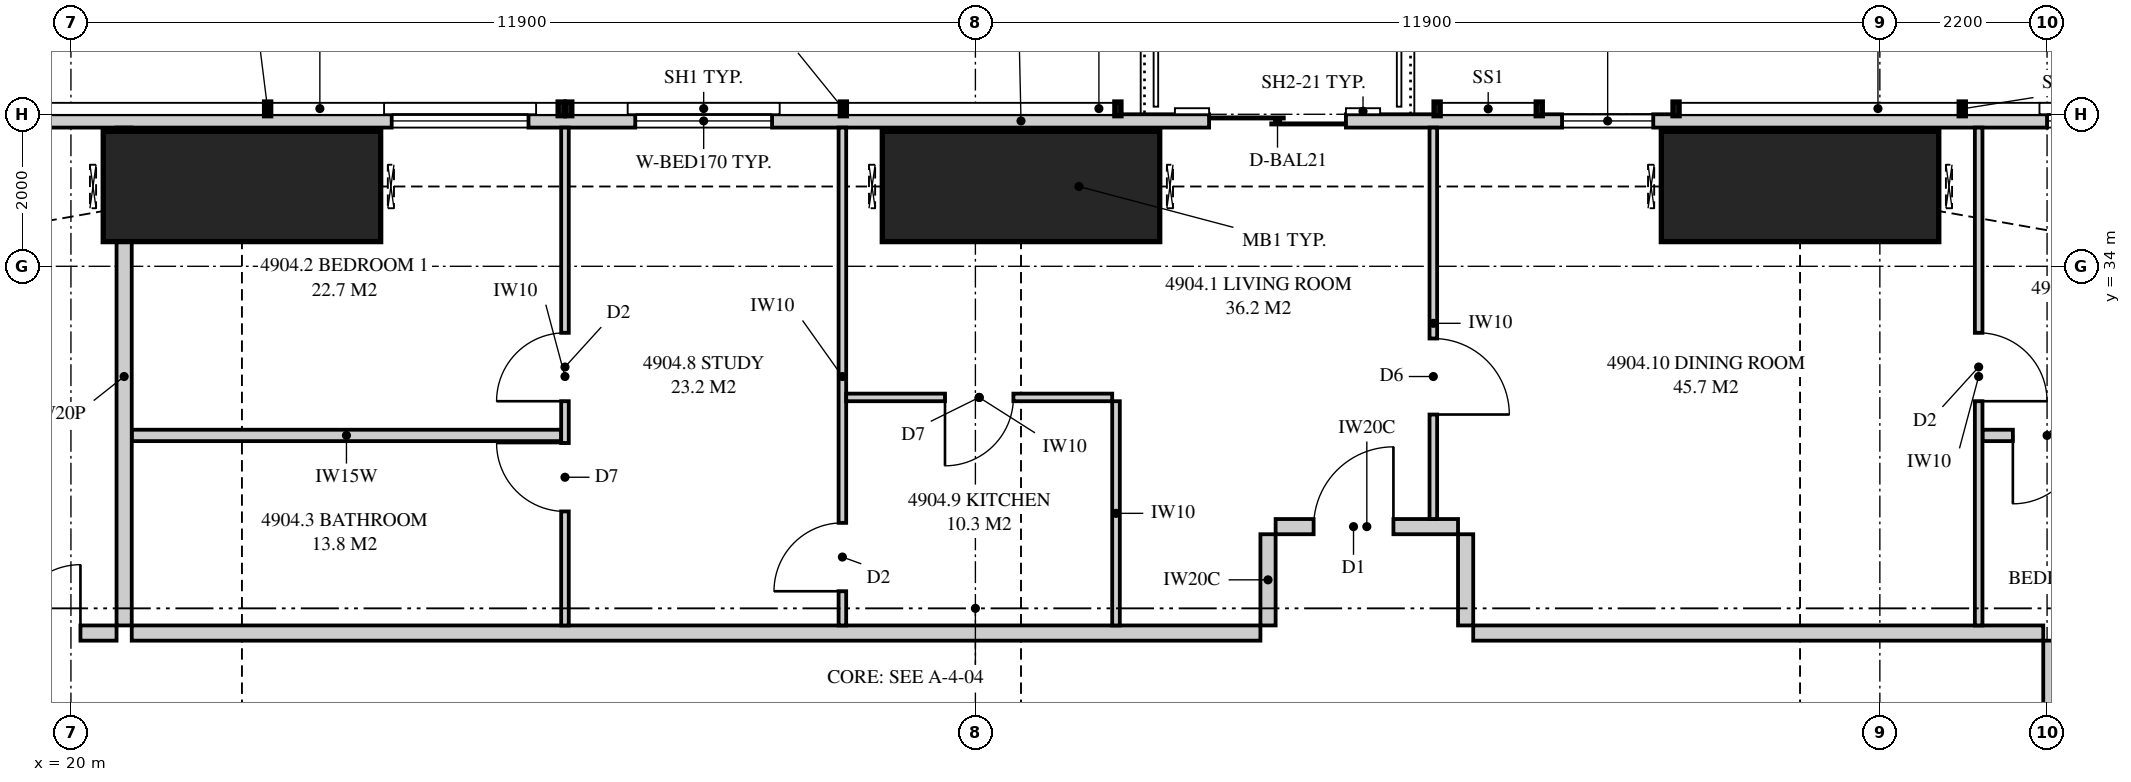
"""IFC4 building model, lengths in metres.
Left out: names, types, materials, properties, quantities, classifications, styles, units other than length and angle.
Written with IfcOpenShell. Run it as: python <this file> out.ifc"""

import sys

from ifc_helpers import new_model, si_unit, direction, frame, frame_2d, origin, origin_2d, place, context, subcontext, project, spatial, polyline, rectangle, outline, extrude, element, fill, save


model = new_model("IFC4")
c1 = context("Model", 3, precision=1e-05, world=origin(), true_north=direction((0.0, 1.0)))
c2 = subcontext(c1, "Body", "Model", "MODEL_VIEW")
j1 = project(units=[si_unit("LENGTHUNIT", "METRE"), si_unit("PLANEANGLEUNIT", "RADIAN")], contexts=[c1])
p1 = place(None, origin())
s1 = spatial("IfcSite", under=j1, at=p1, CompositionType="ELEMENT")
p2 = place(p1, origin())
s2 = spatial("IfcBuilding", under=s1, at=p2, CompositionType="ELEMENT")
p3 = place(p2, frame((0.0, 0.0, 181.15)))
s3 = spatial("IfcBuildingStorey", under=s2, at=p3, CompositionType="ELEMENT", Elevation=181.15)
for number, where, z_axis, x_axis in (
    (1, (42.75, 35.05, 0.0), (0.0, 0.0, 1.0), (0.0, 1.0, 0.0)),
    (2, (32.5, 35.05, 0.0), (0.0, 0.0, 1.0), (0.0, 1.0, 0.0)),
    (3, (22.25, 35.05, 0.0), (0.0, 0.0, 1.0), (0.0, 1.0, 0.0)),
):
    element("IfcColumn", number, at=place(p3, frame(where, z_axis=z_axis, x_axis=x_axis)), inside=s3, PredefinedType="COLUMN", context=c2, shape_type="SweptSolid", body=[
        extrude(rectangle(XDim=1.45, YDim=3.65, at=origin_2d()), origin(), (0.0, 0.0, 1.0), 3.35),
    ])
p4 = place(p3, frame((49.949, 35.913, 0.0), z_axis=(0.0, 0.0, 1.0), x_axis=(-1.0, 0.0, 0.0)))
e4 = element("IfcWall", 4, at=p4, inside=s3, PredefinedType="SOLIDWALL", context=c2, shape_type="SweptSolid", body=[
    extrude(outline(polyline([(0.0, 0.0), (34.897, 0.0), (34.897, 3.11), (27.91, 3.11), (27.91, 2.15), (27.836, 2.15), (27.836, 3.11), (27.699, 3.11), (27.699, 2.15), (7.199, 2.15), (7.199, 3.11), (7.062, 3.11), (7.062, 2.15), (6.987, 2.15), (6.987, 3.11), (0.0, 3.11), (0.0, 0.0)])), frame((0.0, 0.087, 0.0), z_axis=(0.0, -1.0, 0.0), x_axis=(1.0, 0.0, 0.0)), (0.0, 0.0, 1.0), 0.175),
])
p5 = place(p4, frame((2.149, 0.0, 0.4)))
e5 = element("IfcOpeningElement", 5, at=p5, cuts=e4, PredefinedType="OPENING", context=c2, shape_type="SweptSolid", body=[
    extrude(rectangle(XDim=1.8, YDim=1.7, at=frame_2d((0.9, 0.85))), frame((0.0, 0.097, 0.0), z_axis=(0.0, -1.0, 0.0), x_axis=(1.0, 0.0, 0.0)), (0.0, 0.0, 1.0), 0.195),
])
p6 = place(p4, frame((9.13, 0.0, 0.4)))
e6 = element("IfcOpeningElement", 6, at=p6, cuts=e4, PredefinedType="OPENING", context=c2, shape_type="SweptSolid", body=[
    extrude(rectangle(XDim=1.2, YDim=1.7, at=frame_2d((0.6, 0.85))), frame((0.0, 0.097, 0.0), z_axis=(0.0, -1.0, 0.0), x_axis=(1.0, 0.0, 0.0)), (0.0, 0.0, 1.0), 0.195),
])
p7 = place(p4, frame((13.174, 0.0, 0.0)))
e7 = element("IfcOpeningElement", 7, at=p7, cuts=e4, PredefinedType="OPENING", context=c2, shape_type="SweptSolid", body=[
    extrude(rectangle(XDim=1.8, YDim=2.1, at=frame_2d((0.9, 1.05))), frame((0.0, 0.097, 0.0), z_axis=(0.0, -1.0, 0.0), x_axis=(1.0, 0.0, 0.0)), (0.0, 0.0, 1.0), 0.195),
])
p8 = place(p4, frame((20.724, 0.0, 0.4)))
e8 = element("IfcOpeningElement", 8, at=p8, cuts=e4, PredefinedType="OPENING", context=c2, shape_type="SweptSolid", body=[
    extrude(rectangle(XDim=1.8, YDim=1.7, at=frame_2d((0.9, 0.85))), frame((0.0, 0.097, 0.0), z_axis=(0.0, -1.0, 0.0), x_axis=(1.0, 0.0, 0.0)), (0.0, 0.0, 1.0), 0.195),
])
p9 = place(p4, frame((23.929, 0.0, 0.4)))
e9 = element("IfcOpeningElement", 9, at=p9, cuts=e4, PredefinedType="OPENING", context=c2, shape_type="SweptSolid", body=[
    extrude(rectangle(XDim=1.8, YDim=1.7, at=frame_2d((0.9, 0.85))), frame((0.0, 0.097, 0.0), z_axis=(0.0, -1.0, 0.0), x_axis=(1.0, 0.0, 0.0)), (0.0, 0.0, 1.0), 0.195),
])
p10 = place(p4, frame((31.523, 0.0, 0.4)))
e10 = element("IfcOpeningElement", 10, at=p10, cuts=e4, PredefinedType="OPENING", context=c2, shape_type="SweptSolid", body=[
    extrude(rectangle(XDim=1.2, YDim=1.7, at=frame_2d((0.6, 0.85))), frame((0.0, 0.097, 0.0), z_axis=(0.0, -1.0, 0.0), x_axis=(1.0, 0.0, 0.0)), (0.0, 0.0, 1.0), 0.195),
])
p11 = place(p3, frame((20.7, 35.825, 0.0), z_axis=(0.0, 0.0, 1.0), x_axis=(0.0, -1.0, 0.0)))
e11 = element("IfcWall", 11, at=p11, inside=s3, PredefinedType="PARTITIONING", context=c2, shape_type="SweptSolid", body=[
    extrude(outline(polyline([(0.0, 0.0), (6.55, 0.0), (6.55, 3.11), (1.973, 3.11), (1.973, 2.15), (0.125, 2.15), (0.125, 3.11), (0.0, 3.11), (0.0, 0.0)])), frame((0.0, 0.1, 0.0), z_axis=(0.0, -1.0, 0.0), x_axis=(1.0, 0.0, 0.0)), (0.0, 0.0, 1.0), 0.2),
])
p12 = place(p3, frame((17.85, 29.175, 0.0), z_axis=(0.0, 0.0, 1.0), x_axis=(1.0, 0.0, 0.0)))
e12 = element("IfcWall", 12, at=p12, inside=s3, PredefinedType="PARTITIONING", context=c2, shape_type="SweptSolid", body=[
    extrude(rectangle(XDim=2.75, YDim=0.2, at=frame_2d((1.375, 0.0))), origin(), (0.0, 0.0, 1.0), 3.11),
])
p13 = place(p12, frame((0.475, 0.0, 0.0)))
e13 = element("IfcOpeningElement", 13, at=p13, cuts=e12, PredefinedType="OPENING", context=c2, shape_type="SweptSolid", body=[
    extrude(rectangle(XDim=1.8, YDim=2.1, at=frame_2d((0.9, 1.05))), frame((0.0, 0.11, 0.0), z_axis=(0.0, -1.0, 0.0), x_axis=(1.0, 0.0, 0.0)), (0.0, 0.0, 1.0), 0.22),
])
p14 = place(p3, frame((20.8, 29.175, 0.0), z_axis=(0.0, 0.0, 1.0), x_axis=(1.0, 0.0, 0.0)))
e14 = element("IfcWall", 14, at=p14, inside=s3, PredefinedType="PARTITIONING", context=c2, shape_type="SweptSolid", body=[
    extrude(outline(polyline([(0.0, 0.0), (14.85, 0.0), (14.85, 3.11), (12.037, 3.11), (12.037, 2.541), (11.363, 2.541), (11.363, 3.11), (1.787, 3.11), (1.787, 2.541), (1.113, 2.541), (1.113, 3.11), (0.0, 3.11), (0.0, 0.0)])), frame((0.0, 0.1, 0.0), z_axis=(0.0, -1.0, 0.0), x_axis=(1.0, 0.0, 0.0)), (0.0, 0.0, 1.0), 0.2),
])
p15 = place(p3, frame((26.5, 35.825, 0.0), z_axis=(0.0, 0.0, 1.0), x_axis=(0.0, -1.0, 0.0)))
e15 = element("IfcWall", 15, at=p15, inside=s3, PredefinedType="PARTITIONING", context=c2, shape_type="SweptSolid", body=[
    extrude(outline(polyline([(0.0, 0.0), (6.55, 0.0), (6.55, 3.11), (1.635, 3.11), (1.635, 2.15), (0.0, 2.15), (0.0, 3.11), (0.0, 0.0)])), frame((0.0, 0.05, 0.0), z_axis=(0.0, -1.0, 0.0), x_axis=(1.0, 0.0, 0.0)), (0.0, 0.0, 1.0), 0.1),
])
p16 = place(p15, frame((2.7, 0.0, 0.0)))
e16 = element("IfcOpeningElement", 16, at=p16, cuts=e15, PredefinedType="OPENING", context=c2, shape_type="SweptSolid", body=[
    extrude(rectangle(XDim=0.9, YDim=2.1, at=frame_2d((0.45, 1.05))), frame((0.0, 0.06, 0.0), z_axis=(0.0, -1.0, 0.0), x_axis=(1.0, 0.0, 0.0)), (0.0, 0.0, 1.0), 0.12),
])
p17 = place(p15, frame((4.15, 0.0, 0.0)))
e17 = element("IfcOpeningElement", 17, at=p17, cuts=e15, PredefinedType="OPENING", context=c2, shape_type="SweptSolid", body=[
    extrude(rectangle(XDim=0.9, YDim=2.1, at=frame_2d((0.45, 1.05))), frame((0.0, 0.06, 0.0), z_axis=(0.0, -1.0, 0.0), x_axis=(1.0, 0.0, 0.0)), (0.0, 0.0, 1.0), 0.12),
])
p18 = place(p3, frame((45.1, 35.825, 0.0), z_axis=(0.0, 0.0, 1.0), x_axis=(0.0, -1.0, 0.0)))
e18 = element("IfcWall", 18, at=p18, inside=s3, PredefinedType="PARTITIONING", context=c2, shape_type="SweptSolid", body=[
    extrude(outline(polyline([(0.0, 0.0), (6.55, 0.0), (6.55, 3.11), (2.064, 3.11), (2.064, 2.15), (0.318, 2.15), (0.318, 3.11), (0.0, 3.11), (0.0, 0.0)])), frame((0.0, 0.05, 0.0), z_axis=(0.0, -1.0, 0.0), x_axis=(1.0, 0.0, 0.0)), (0.0, 0.0, 1.0), 0.1),
])
p19 = place(p18, frame((2.7, 0.0, 0.0)))
e19 = element("IfcOpeningElement", 19, at=p19, cuts=e18, PredefinedType="OPENING", context=c2, shape_type="SweptSolid", body=[
    extrude(rectangle(XDim=0.9, YDim=2.1, at=frame_2d((0.45, 1.05))), frame((0.0, 0.06, 0.0), z_axis=(0.0, -1.0, 0.0), x_axis=(1.0, 0.0, 0.0)), (0.0, 0.0, 1.0), 0.12),
])
p20 = place(p3, frame((20.8, 31.775, 0.0), z_axis=(0.0, 0.0, 1.0), x_axis=(1.0, 0.0, 0.0)))
e20 = element("IfcWall", 20, at=p20, inside=s3, PredefinedType="PLUMBINGWALL", context=c2, shape_type="SweptSolid", body=[
    extrude(outline(polyline([(0.0, 0.0), (5.65, 0.0), (5.65, 3.11), (1.762, 3.11), (1.762, 2.541), (1.138, 2.541), (1.138, 3.11), (0.0, 3.11), (0.0, 0.0)])), frame((0.0, 0.075, 0.0), z_axis=(0.0, -1.0, 0.0), x_axis=(1.0, 0.0, 0.0)), (0.0, 0.0, 1.0), 0.15),
])
p21 = place(p3, frame((45.15, 31.775, 0.0), z_axis=(0.0, 0.0, 1.0), x_axis=(1.0, 0.0, 0.0)))
e21 = element("IfcWall", 21, at=p21, inside=s3, PredefinedType="PLUMBINGWALL", context=c2, shape_type="SweptSolid", body=[
    extrude(rectangle(XDim=3.5, YDim=0.15, at=frame_2d((1.75, 0.0))), origin(), (0.0, 0.0, 1.0), 3.11),
])
p22 = place(p21, frame((0.4, 0.0, 0.0)))
e22 = element("IfcOpeningElement", 22, at=p22, cuts=e21, PredefinedType="OPENING", context=c2, shape_type="SweptSolid", body=[
    extrude(rectangle(XDim=0.9, YDim=2.1, at=frame_2d((0.45, 1.05))), frame((0.0, 0.085, 0.0), z_axis=(0.0, -1.0, 0.0), x_axis=(1.0, 0.0, 0.0)), (0.0, 0.0, 1.0), 0.17),
])
p23 = place(p3, frame((30.15, 35.825, 0.0), z_axis=(0.0, 0.0, 1.0), x_axis=(0.0, -1.0, 0.0)))
e23 = element("IfcWall", 23, at=p23, inside=s3, PredefinedType="PARTITIONING", context=c2, shape_type="SweptSolid", body=[
    extrude(outline(polyline([(0.0, 0.0), (6.55, 0.0), (6.55, 3.11), (1.635, 3.11), (1.635, 2.15), (0.0, 2.15), (0.0, 3.11), (0.0, 0.0)])), frame((0.0, 0.05, 0.0), z_axis=(0.0, -1.0, 0.0), x_axis=(1.0, 0.0, 0.0)), (0.0, 0.0, 1.0), 0.1),
])
p24 = place(p23, frame((5.2, 0.0, 0.0)))
e24 = element("IfcOpeningElement", 24, at=p24, cuts=e23, PredefinedType="OPENING", context=c2, shape_type="SweptSolid", body=[
    extrude(rectangle(XDim=0.9, YDim=2.1, at=frame_2d((0.45, 1.05))), frame((0.0, 0.06, 0.0), z_axis=(0.0, -1.0, 0.0), x_axis=(1.0, 0.0, 0.0)), (0.0, 0.0, 1.0), 0.12),
])
p25 = place(p3, frame((30.2, 32.275, 0.0), z_axis=(0.0, 0.0, 1.0), x_axis=(1.0, 0.0, 0.0)))
e25 = element("IfcWall", 25, at=p25, inside=s3, PredefinedType="PARTITIONING", context=c2, shape_type="SweptSolid", body=[
    extrude(outline(polyline([(0.0, 0.0), (3.5, 0.0), (3.5, 3.11), (2.587, 3.11), (2.587, 2.541), (2.013, 2.541), (2.013, 3.11), (0.0, 3.11), (0.0, 0.0)])), frame((0.0, 0.05, 0.0), z_axis=(0.0, -1.0, 0.0), x_axis=(1.0, 0.0, 0.0)), (0.0, 0.0, 1.0), 0.1),
])
p26 = place(p25, frame((1.3, 0.0, 0.0)))
e26 = element("IfcOpeningElement", 26, at=p26, cuts=e25, PredefinedType="OPENING", context=c2, shape_type="SweptSolid", body=[
    extrude(rectangle(XDim=0.9, YDim=2.1, at=frame_2d((0.45, 1.05))), frame((0.0, 0.06, 0.0), z_axis=(0.0, -1.0, 0.0), x_axis=(1.0, 0.0, 0.0)), (0.0, 0.0, 1.0), 0.12),
])
p27 = place(p3, frame((33.75, 32.225, 0.0), z_axis=(0.0, 0.0, 1.0), x_axis=(0.0, -1.0, 0.0)))
e27 = element("IfcWall", 27, at=p27, inside=s3, PredefinedType="PARTITIONING", context=c2, shape_type="SweptSolid", body=[
    extrude(rectangle(XDim=2.95, YDim=0.1, at=frame_2d((1.475, 0.0))), origin(), (0.0, 0.0, 1.0), 3.11),
])
p28 = place(p3, frame((37.925, 35.825, 0.0), z_axis=(0.0, 0.0, 1.0), x_axis=(0.0, -1.0, 0.0)))
e28 = element("IfcWall", 28, at=p28, inside=s3, PredefinedType="PARTITIONING", context=c2, shape_type="SweptSolid", body=[
    extrude(outline(polyline([(0.0, 0.0), (5.15, 0.0), (5.15, 3.11), (1.635, 3.11), (1.635, 2.15), (0.0, 2.15), (0.0, 3.11), (0.0, 0.0)])), frame((0.0, 0.05, 0.0), z_axis=(0.0, -1.0, 0.0), x_axis=(1.0, 0.0, 0.0)), (0.0, 0.0, 1.0), 0.1),
])
p29 = place(p28, frame((2.775, 0.0, 0.0)))
e29 = element("IfcOpeningElement", 29, at=p29, cuts=e28, PredefinedType="OPENING", context=c2, shape_type="SweptSolid", body=[
    extrude(rectangle(XDim=1.0, YDim=2.1, at=frame_2d((0.5, 1.05))), frame((0.0, 0.06, 0.0), z_axis=(0.0, -1.0, 0.0), x_axis=(1.0, 0.0, 0.0)), (0.0, 0.0, 1.0), 0.12),
])
p30 = place(p3, frame((46.05, 23.25, 0.0), z_axis=(0.0, 0.0, 1.0), x_axis=(0.0, 1.0, 0.0)))
e30 = element("IfcWall", 30, at=p30, inside=s3, PredefinedType="PARTITIONING", context=c2, shape_type="SweptSolid", body=[
    extrude(outline(polyline([(0.0, 0.0), (5.825, 0.0), (5.825, 3.11), (2.087, 3.11), (2.087, 2.541), (1.413, 2.541), (1.413, 3.11), (0.0, 3.11), (0.0, 0.0)])), frame((0.0, 0.1, 0.0), z_axis=(0.0, -1.0, 0.0), x_axis=(1.0, 0.0, 0.0)), (0.0, 0.0, 1.0), 0.2),
])
p31 = place(p30, frame((2.413, 0.0, 0.0)))
e31 = element("IfcOpeningElement", 31, at=p31, cuts=e30, PredefinedType="OPENING", context=c2, shape_type="SweptSolid", body=[
    extrude(rectangle(XDim=1.05, YDim=2.2, at=frame_2d((0.525, 1.1))), frame((0.0, 0.11, 0.0), z_axis=(0.0, -1.0, 0.0), x_axis=(1.0, 0.0, 0.0)), (0.0, 0.0, 1.0), 0.22),
])
p32 = place(p3, frame((38.45, 29.175, 0.0), z_axis=(0.0, 0.0, 1.0), x_axis=(1.0, 0.0, 0.0)))
e32 = element("IfcWall", 32, at=p32, inside=s3, PredefinedType="PARTITIONING", context=c2, shape_type="SweptSolid", body=[
    extrude(outline(polyline([(0.0, 0.0), (7.5, 0.0), (7.5, 3.11), (4.637, 3.11), (4.637, 2.541), (3.963, 2.541), (3.963, 3.11), (0.0, 3.11), (0.0, 0.0)])), frame((0.0, 0.1, 0.0), z_axis=(0.0, -1.0, 0.0), x_axis=(1.0, 0.0, 0.0)), (0.0, 0.0, 1.0), 0.2),
])
p33 = place(p3, frame((35.85, 30.575, 0.0), z_axis=(0.0, 0.0, 1.0), x_axis=(1.0, 0.0, 0.0)))
e33 = element("IfcWall", 33, at=p33, inside=s3, PredefinedType="PARTITIONING", context=c2, shape_type="SweptSolid", body=[
    extrude(rectangle(XDim=2.4, YDim=0.2, at=frame_2d((1.2, 0.0))), origin(), (0.0, 0.0, 1.0), 3.11),
])
p34 = place(p33, frame((0.5, 0.0, 0.0)))
e34 = element("IfcOpeningElement", 34, at=p34, cuts=e33, PredefinedType="OPENING", context=c2, shape_type="SweptSolid", body=[
    extrude(rectangle(XDim=1.05, YDim=2.2, at=frame_2d((0.525, 1.1))), frame((0.0, 0.11, 0.0), z_axis=(0.0, -1.0, 0.0), x_axis=(1.0, 0.0, 0.0)), (0.0, 0.0, 1.0), 0.22),
])
for number, where, z_axis, x_axis in (
    (35, (35.75, 29.275, 0.0), (0.0, 0.0, 1.0), (0.0, 1.0, 0.0)),
    (36, (38.35, 29.275, 0.0), (0.0, 0.0, 1.0), (0.0, 1.0, 0.0)),
):
    element("IfcWall", number, at=place(p3, frame(where, z_axis=z_axis, x_axis=x_axis)), inside=s3, PredefinedType="PARTITIONING", context=c2, shape_type="SweptSolid", body=[
        extrude(rectangle(XDim=1.2, YDim=0.2, at=frame_2d((0.6, 0.0))), origin(), (0.0, 0.0, 1.0), 3.11),
    ])
p35 = place(p5, origin())
e37 = element("IfcWindow", 37, at=p35, inside=s3, PartitioningType="SINGLE_PANEL", PredefinedType="WINDOW", context=c2, shape_type="SweptSolid", body=[
    extrude(rectangle(XDim=1.8, YDim=1.7, at=frame_2d((0.9, 0.85))), frame((0.0, 0.03, 0.0), z_axis=(0.0, -1.0, 0.0), x_axis=(1.0, 0.0, 0.0)), (0.0, 0.0, 1.0), 0.06),
])
fill(e5, e37)
p36 = place(p6, origin())
e38 = element("IfcWindow", 38, at=p36, inside=s3, PartitioningType="SINGLE_PANEL", PredefinedType="WINDOW", context=c2, shape_type="SweptSolid", body=[
    extrude(rectangle(XDim=1.2, YDim=1.7, at=frame_2d((0.6, 0.85))), frame((0.0, 0.03, 0.0), z_axis=(0.0, -1.0, 0.0), x_axis=(1.0, 0.0, 0.0)), (0.0, 0.0, 1.0), 0.06),
])
fill(e6, e38)
p37 = place(p7, origin())
e39 = element("IfcDoor", 39, at=p37, inside=s3, OperationType="SLIDING_TO_LEFT", PredefinedType="DOOR", context=c2, shape_type="SweptSolid", body=[
    extrude(rectangle(XDim=1.8, YDim=2.1, at=frame_2d((0.9, 1.05))), frame((0.0, 0.025, 0.0), z_axis=(0.0, -1.0, 0.0), x_axis=(1.0, 0.0, 0.0)), (0.0, 0.0, 1.0), 0.05),
])
fill(e7, e39)
p38 = place(p8, origin())
e40 = element("IfcWindow", 40, at=p38, inside=s3, PartitioningType="SINGLE_PANEL", PredefinedType="WINDOW", context=c2, shape_type="SweptSolid", body=[
    extrude(rectangle(XDim=1.8, YDim=1.7, at=frame_2d((0.9, 0.85))), frame((0.0, 0.03, 0.0), z_axis=(0.0, -1.0, 0.0), x_axis=(1.0, 0.0, 0.0)), (0.0, 0.0, 1.0), 0.06),
])
fill(e8, e40)
p39 = place(p9, origin())
e41 = element("IfcWindow", 41, at=p39, inside=s3, PartitioningType="SINGLE_PANEL", PredefinedType="WINDOW", context=c2, shape_type="SweptSolid", body=[
    extrude(rectangle(XDim=1.8, YDim=1.7, at=frame_2d((0.9, 0.85))), frame((0.0, 0.03, 0.0), z_axis=(0.0, -1.0, 0.0), x_axis=(1.0, 0.0, 0.0)), (0.0, 0.0, 1.0), 0.06),
])
fill(e9, e41)
p40 = place(p13, origin())
e42 = element("IfcDoor", 42, at=p40, inside=s3, OperationType="DOUBLE_DOOR_SINGLE_SWING", PredefinedType="DOOR", context=c2, shape_type="SweptSolid", body=[
    extrude(rectangle(XDim=1.8, YDim=2.1, at=frame_2d((0.9, 1.05))), frame((0.0, 0.025, 0.0), z_axis=(0.0, -1.0, 0.0), x_axis=(1.0, 0.0, 0.0)), (0.0, 0.0, 1.0), 0.05),
])
fill(e13, e42)
p41 = place(p34, origin())
e43 = element("IfcDoor", 43, at=p41, inside=s3, OperationType="SINGLE_SWING_RIGHT", PredefinedType="DOOR", context=c2, shape_type="SweptSolid", body=[
    extrude(rectangle(XDim=1.05, YDim=2.2, at=frame_2d((0.525, 1.1))), frame((0.0, 0.025, 0.0), z_axis=(0.0, -1.0, 0.0), x_axis=(1.0, 0.0, 0.0)), (0.0, 0.0, 1.0), 0.05),
])
fill(e34, e43)
p42 = place(p16, frame((0.9, 0.0, 0.0), z_axis=(0.0, 0.0, 1.0), x_axis=(-1.0, 0.0, 0.0)))
e44 = element("IfcDoor", 44, at=p42, inside=s3, OperationType="SINGLE_SWING_LEFT", PredefinedType="DOOR", context=c2, shape_type="SweptSolid", body=[
    extrude(rectangle(XDim=0.9, YDim=2.1, at=frame_2d((0.45, 1.05))), frame((0.0, 0.025, 0.0), z_axis=(0.0, -1.0, 0.0), x_axis=(1.0, 0.0, 0.0)), (0.0, 0.0, 1.0), 0.05),
])
fill(e16, e44)
p43 = place(p17, frame((0.9, 0.0, 0.0), z_axis=(0.0, 0.0, 1.0), x_axis=(-1.0, 0.0, 0.0)))
e45 = element("IfcDoor", 45, at=p43, inside=s3, OperationType="SINGLE_SWING_RIGHT", PredefinedType="DOOR", context=c2, shape_type="SweptSolid", body=[
    extrude(rectangle(XDim=0.9, YDim=2.1, at=frame_2d((0.45, 1.05))), frame((0.0, 0.025, 0.0), z_axis=(0.0, -1.0, 0.0), x_axis=(1.0, 0.0, 0.0)), (0.0, 0.0, 1.0), 0.05),
])
fill(e17, e45)
p44 = place(p19, origin())
e46 = element("IfcDoor", 46, at=p44, inside=s3, OperationType="SINGLE_SWING_RIGHT", PredefinedType="DOOR", context=c2, shape_type="SweptSolid", body=[
    extrude(rectangle(XDim=0.9, YDim=2.1, at=frame_2d((0.45, 1.05))), frame((0.0, 0.025, 0.0), z_axis=(0.0, -1.0, 0.0), x_axis=(1.0, 0.0, 0.0)), (0.0, 0.0, 1.0), 0.05),
])
fill(e19, e46)
p45 = place(p22, frame((0.9, 0.0, 0.0), z_axis=(0.0, 0.0, 1.0), x_axis=(-1.0, 0.0, 0.0)))
e47 = element("IfcDoor", 47, at=p45, inside=s3, OperationType="SINGLE_SWING_RIGHT", PredefinedType="DOOR", context=c2, shape_type="SweptSolid", body=[
    extrude(rectangle(XDim=0.9, YDim=2.1, at=frame_2d((0.45, 1.05))), frame((0.0, 0.025, 0.0), z_axis=(0.0, -1.0, 0.0), x_axis=(1.0, 0.0, 0.0)), (0.0, 0.0, 1.0), 0.05),
])
fill(e22, e47)
p46 = place(p24, frame((0.9, 0.0, 0.0), z_axis=(0.0, 0.0, 1.0), x_axis=(-1.0, 0.0, 0.0)))
e48 = element("IfcDoor", 48, at=p46, inside=s3, OperationType="SINGLE_SWING_LEFT", PredefinedType="DOOR", context=c2, shape_type="SweptSolid", body=[
    extrude(rectangle(XDim=0.9, YDim=2.1, at=frame_2d((0.45, 1.05))), frame((0.0, 0.025, 0.0), z_axis=(0.0, -1.0, 0.0), x_axis=(1.0, 0.0, 0.0)), (0.0, 0.0, 1.0), 0.05),
])
fill(e24, e48)
p47 = place(p26, frame((0.9, 0.0, 0.0), z_axis=(0.0, 0.0, 1.0), x_axis=(-1.0, 0.0, 0.0)))
e49 = element("IfcDoor", 49, at=p47, inside=s3, OperationType="SINGLE_SWING_RIGHT", PredefinedType="DOOR", context=c2, shape_type="SweptSolid", body=[
    extrude(rectangle(XDim=0.9, YDim=2.1, at=frame_2d((0.45, 1.05))), frame((0.0, 0.025, 0.0), z_axis=(0.0, -1.0, 0.0), x_axis=(1.0, 0.0, 0.0)), (0.0, 0.0, 1.0), 0.05),
])
fill(e26, e49)
p48 = place(p29, origin())
e50 = element("IfcDoor", 50, at=p48, inside=s3, OperationType="SINGLE_SWING_RIGHT", PredefinedType="DOOR", context=c2, shape_type="SweptSolid", body=[
    extrude(rectangle(XDim=1.0, YDim=2.1, at=frame_2d((0.5, 1.05))), frame((0.0, 0.025, 0.0), z_axis=(0.0, -1.0, 0.0), x_axis=(1.0, 0.0, 0.0)), (0.0, 0.0, 1.0), 0.05),
])
fill(e29, e50)
save(model, sys.argv[1])
